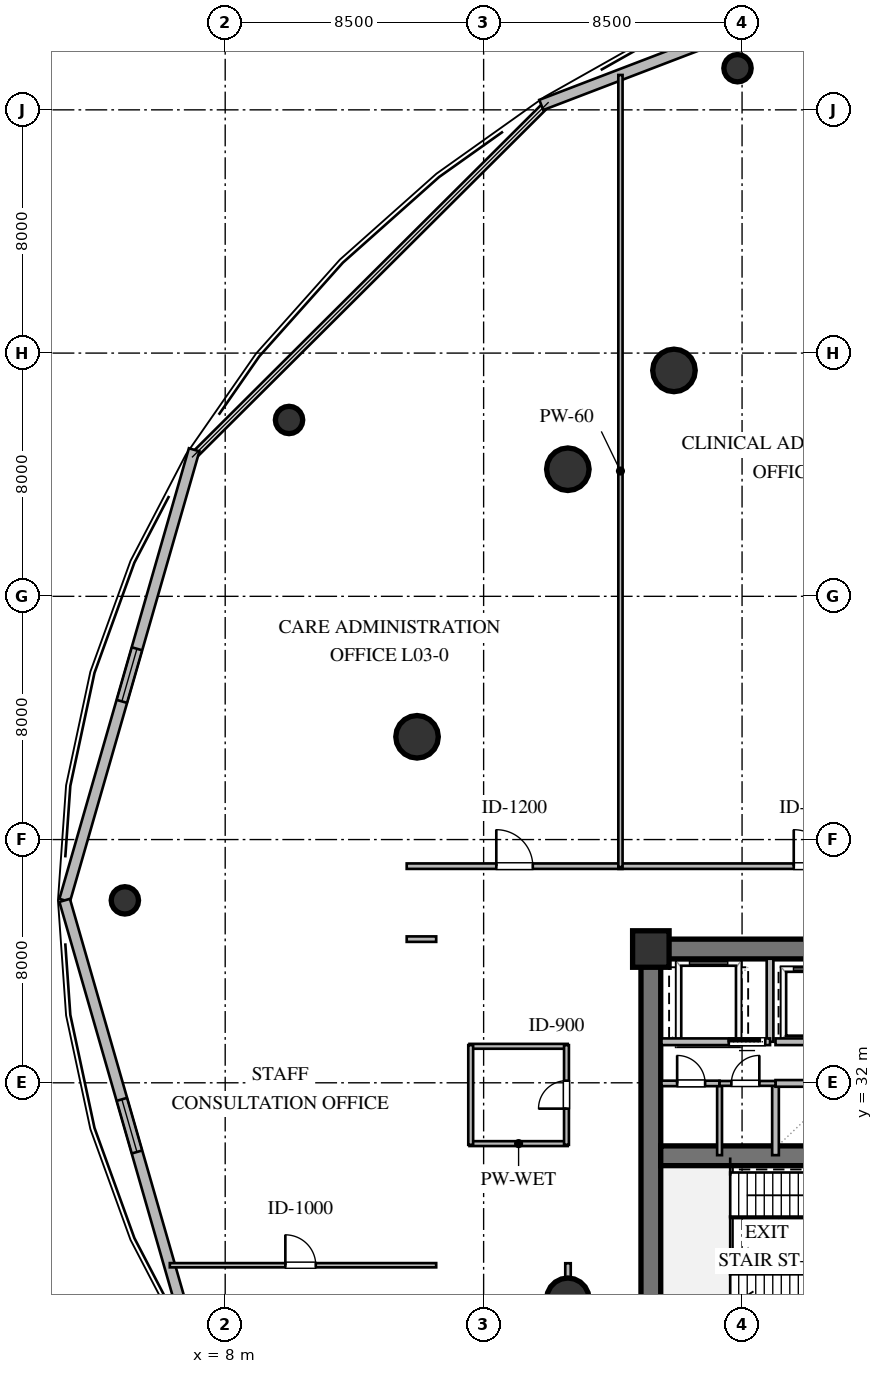
"""IFC4 building model, lengths in metres.
Left out: names, types, materials, properties, quantities, classifications, styles, units other than length and angle.
Written with IfcOpenShell. Run it as: python <this file> out.ifc"""

import sys

from ifc_helpers import new_model, si_unit, direction, frame, frame_2d, origin, origin_2d, place, context, subcontext, project, spatial, rectangle, circle, extrude, element, fill, save


model = new_model("IFC4")
c1 = context("Model", 3, precision=1e-05, world=origin(), true_north=direction((0.0, 1.0)))
c2 = subcontext(c1, "Body", "Model", "MODEL_VIEW")
j1 = project(units=[si_unit("LENGTHUNIT", "METRE"), si_unit("PLANEANGLEUNIT", "RADIAN")], contexts=[c1])
p1 = place(None, origin())
s1 = spatial("IfcSite", under=j1, at=p1, CompositionType="ELEMENT")
p2 = place(p1, origin())
s2 = spatial("IfcBuilding", under=s1, at=p2, CompositionType="ELEMENT")
p3 = place(p2, frame((0.0, 0.0, 14.4)))
s3 = spatial("IfcBuildingStorey", under=s2, at=p3, CompositionType="ELEMENT", Elevation=14.4)
p4 = place(p3, frame((21.675, 36.4, 0.0), z_axis=(0.0, 0.0, 1.0), x_axis=(1.0, 0.0, 0.0)))
e1 = element("IfcWall", 1, at=p4, inside=s3, PredefinedType="SHEAR", context=c2, shape_type="SweptSolid", body=[
    extrude(rectangle(XDim=22.65, YDim=0.65, at=frame_2d((11.325, 0.0))), origin(), (0.0, 0.0, 1.0), 4.52),
])
p5 = place(p3, frame((22.0, 23.925, 0.0), z_axis=(0.0, 0.0, 1.0), x_axis=(0.0, 1.0, 0.0)))
e2 = element("IfcWall", 2, at=p5, inside=s3, PredefinedType="SHEAR", context=c2, shape_type="SweptSolid", body=[
    extrude(rectangle(XDim=12.15, YDim=0.65, at=frame_2d((6.075, 0.0))), origin(), (0.0, 0.0, 1.0), 4.52),
])
p6 = place(p3, frame((22.325, 29.6, 0.0), z_axis=(0.0, 0.0, 1.0), x_axis=(1.0, 0.0, 0.0)))
e3 = element("IfcWall", 3, at=p6, inside=s3, PredefinedType="SHEAR", context=c2, shape_type="SweptSolid", body=[
    extrude(rectangle(XDim=21.35, YDim=0.65, at=frame_2d((10.675, 0.0))), origin(), (0.0, 0.0, 1.0), 4.52),
])
p7 = place(p6, frame((12.125, 0.0, 0.0)))
e4 = element("IfcOpeningElement", 4, at=p7, cuts=e3, PredefinedType="OPENING", context=c2, shape_type="SweptSolid", body=[
    extrude(rectangle(XDim=1.15, YDim=2.1, at=frame_2d((0.575, 1.05))), frame((0.0, 0.335, 0.0), z_axis=(0.0, -1.0, 0.0), x_axis=(1.0, 0.0, 0.0)), (0.0, 0.0, 1.0), 0.67),
])
p8 = place(p3, frame((22.0, 36.4, 0.0), z_axis=(0.0, 0.0, 1.0), x_axis=(1.0, 0.0, 0.0)))
e5 = element("IfcColumn", 5, at=p8, inside=s3, PredefinedType="COLUMN", context=c2, shape_type="SweptSolid", body=[
    extrude(rectangle(XDim=1.2, YDim=1.2, at=origin_2d()), origin(), (0.0, 0.0, 1.0), 4.8),
])
for number, where, z_axis, x_axis in (
    (6, (22.76, 55.43, 0.0), (0.0, 0.0, 1.0), (1.0, 0.0, 0.0)),
    (7, (19.27, 52.18, 0.0), (0.0, 0.0, 1.0), (1.0, 0.0, 0.0)),
    (8, (14.31, 43.38, 0.0), (0.0, 0.0, 1.0), (1.0, 0.0, 0.0)),
    (9, (19.27, 24.88, 0.0), (0.0, 0.0, 1.0), (1.0, 0.0, 0.0)),
):
    element("IfcColumn", number, at=place(p3, frame(where, z_axis=z_axis, x_axis=x_axis)), inside=s3, PredefinedType="COLUMN", context=c2, shape_type="SweptSolid", body=[
        extrude(circle(Radius=0.7, at=origin_2d()), origin(), (0.0, 0.0, 1.0), 4.8),
    ])
for number, where, z_axis, x_axis in (
    (10, (24.85, 65.37, 0.0), (0.0, 0.0, 1.0), (1.0, 0.0, 0.0)),
    (11, (10.1, 53.8, 0.0), (0.0, 0.0, 1.0), (1.0, 0.0, 0.0)),
    (12, (4.7, 38.0, 0.0), (0.0, 0.0, 1.0), (1.0, 0.0, 0.0)),
):
    element("IfcColumn", number, at=place(p3, frame(where, z_axis=z_axis, x_axis=x_axis)), inside=s3, PredefinedType="COLUMN", context=c2, shape_type="SweptSolid", body=[
        extrude(circle(Radius=0.45, at=origin_2d()), origin(), (0.0, 0.0, 1.0), 4.8),
    ])
p9 = place(p3, frame((35.835, 70.831, 0.0), z_axis=(0.0, 0.0, 1.0), x_axis=(-0.934010262022, -0.357246176238, 0.0)))
e13 = element("IfcWall", 13, at=p9, inside=s3, PredefinedType="STANDARD", context=c2, shape_type="SweptSolid", body=[
    extrude(rectangle(XDim=18.671, YDim=0.36, at=frame_2d((9.335, 0.0))), origin(), (0.0, 0.0, 1.0), 4.52),
])
p10 = place(p9, frame((8.436, 0.0, 1.05)))
e14 = element("IfcOpeningElement", 14, at=p10, cuts=e13, PredefinedType="OPENING", context=c2, shape_type="SweptSolid", body=[
    extrude(rectangle(XDim=1.8, YDim=1.7, at=frame_2d((0.9, 0.85))), frame((0.0, 0.19, 0.0), z_axis=(0.0, -1.0, 0.0), x_axis=(1.0, 0.0, 0.0)), (0.0, 0.0, 1.0), 0.38),
])
p11 = place(p3, frame((6.979, 52.82, 0.0), z_axis=(0.0, 0.0, 1.0), x_axis=(-0.276203409751, -0.961099202186, 0.0)))
e15 = element("IfcWall", 15, at=p11, inside=s3, PredefinedType="STANDARD", context=c2, shape_type="SweptSolid", body=[
    extrude(rectangle(XDim=15.42, YDim=0.36, at=frame_2d((7.71, 0.0))), origin(), (0.0, 0.0, 1.0), 4.52),
])
p12 = place(p11, frame((6.81, 0.0, 1.05)))
e16 = element("IfcOpeningElement", 16, at=p12, cuts=e15, PredefinedType="OPENING", context=c2, shape_type="SweptSolid", body=[
    extrude(rectangle(XDim=1.8, YDim=1.7, at=frame_2d((0.9, 0.85))), frame((0.0, 0.19, 0.0), z_axis=(0.0, -1.0, 0.0), x_axis=(1.0, 0.0, 0.0)), (0.0, 0.0, 1.0), 0.38),
])
p13 = place(p3, frame((2.72, 38.0, 0.0), z_axis=(0.0, 0.0, 1.0), x_axis=(0.276203409751, -0.961099202186, 0.0)))
e17 = element("IfcWall", 17, at=p13, inside=s3, PredefinedType="STANDARD", context=c2, shape_type="SweptSolid", body=[
    extrude(rectangle(XDim=15.42, YDim=0.36, at=frame_2d((7.71, 0.0))), origin(), (0.0, 0.0, 1.0), 4.52),
])
p14 = place(p13, frame((6.81, 0.0, 1.05)))
e18 = element("IfcOpeningElement", 18, at=p14, cuts=e17, PredefinedType="OPENING", context=c2, shape_type="SweptSolid", body=[
    extrude(rectangle(XDim=1.8, YDim=1.7, at=frame_2d((0.9, 0.85))), frame((0.0, 0.19, 0.0), z_axis=(0.0, -1.0, 0.0), x_axis=(1.0, 0.0, 0.0)), (0.0, 0.0, 1.0), 0.38),
])
p15 = place(p3, frame((25.92, 33.35, 0.0), z_axis=(0.0, 0.0, 1.0), x_axis=(0.0, 1.0, 0.0)))
e19 = element("IfcWall", 19, at=p15, inside=s3, PredefinedType="SOLIDWALL", context=c2, shape_type="SweptSolid", body=[
    extrude(rectangle(XDim=2.73, YDim=0.22, at=frame_2d((1.365, 0.0))), origin(), (0.0, 0.0, 1.0), 4.52),
])
p16 = place(p3, frame((22.35, 33.35, 0.0), z_axis=(0.0, 0.0, 1.0), x_axis=(1.0, 0.0, 0.0)))
e20 = element("IfcWall", 20, at=p16, inside=s3, PredefinedType="SOLIDWALL", context=c2, shape_type="SweptSolid", body=[
    extrude(rectangle(XDim=3.57, YDim=0.22, at=frame_2d((1.785, 0.0))), origin(), (0.0, 0.0, 1.0), 4.52),
])
p17 = place(p16, frame((2.213, 0.0, 0.0)))
e21 = element("IfcOpeningElement", 21, at=p17, cuts=e20, PredefinedType="OPENING", context=c2, shape_type="SweptSolid", body=[
    extrude(rectangle(XDim=1.2, YDim=2.1, at=frame_2d((0.6, 1.05))), frame((0.0, 0.12, 0.0), z_axis=(0.0, -1.0, 0.0), x_axis=(1.0, 0.0, 0.0)), (0.0, 0.0, 1.0), 0.24),
])
p18 = place(p3, frame((26.1, 29.62, 0.0), z_axis=(0.0, 0.0, 1.0), x_axis=(0.0, 1.0, 0.0)))
e22 = element("IfcWall", 22, at=p18, inside=s3, PredefinedType="SOLIDWALL", context=c2, shape_type="SweptSolid", body=[
    extrude(rectangle(XDim=2.36, YDim=0.22, at=frame_2d((1.18, 0.0))), origin(), (0.0, 0.0, 1.0), 4.52),
])
p19 = place(p3, frame((26.1, 31.98, 0.0), z_axis=(0.0, 0.0, 1.0), x_axis=(1.0, 0.0, 0.0)))
e23 = element("IfcWall", 23, at=p19, inside=s3, PredefinedType="SOLIDWALL", context=c2, shape_type="SweptSolid", body=[
    extrude(rectangle(XDim=7.8, YDim=0.22, at=frame_2d((3.9, 0.0))), origin(), (0.0, 0.0, 1.0), 4.52),
])
p20 = place(p3, frame((26.1, 33.35, 0.0), z_axis=(0.0, 0.0, 1.0), x_axis=(1.0, 0.0, 0.0)))
e24 = element("IfcWall", 24, at=p20, inside=s3, PredefinedType="SOLIDWALL", context=c2, shape_type="SweptSolid", body=[
    extrude(rectangle(XDim=7.8, YDim=0.22, at=frame_2d((3.9, 0.0))), origin(), (0.0, 0.0, 1.0), 4.52),
])
p21 = place(p20, frame((1.4, 0.0, 0.0)))
e25 = element("IfcOpeningElement", 25, at=p21, cuts=e24, PredefinedType="OPENING", context=c2, shape_type="SweptSolid", body=[
    extrude(rectangle(XDim=1.1, YDim=2.1, at=frame_2d((0.55, 1.05))), frame((0.0, 0.12, 0.0), z_axis=(0.0, -1.0, 0.0), x_axis=(1.0, 0.0, 0.0)), (0.0, 0.0, 1.0), 0.24),
])
p22 = place(p20, frame((5.066, 0.0, 0.0)))
e26 = element("IfcOpeningElement", 26, at=p22, cuts=e24, PredefinedType="OPENING", context=c2, shape_type="SweptSolid", body=[
    extrude(rectangle(XDim=1.1, YDim=2.1, at=frame_2d((0.55, 1.05))), frame((0.0, 0.12, 0.0), z_axis=(0.0, -1.0, 0.0), x_axis=(1.0, 0.0, 0.0)), (0.0, 0.0, 1.0), 0.24),
])
p23 = place(p3, frame((24.26, 29.62, 0.0), z_axis=(0.0, 0.0, 1.0), x_axis=(0.0, 1.0, 0.0)))
e27 = element("IfcWall", 27, at=p23, inside=s3, PredefinedType="PLUMBINGWALL", context=c2, shape_type="SweptSolid", body=[
    extrude(rectangle(XDim=2.36, YDim=0.16, at=frame_2d((1.18, 0.0))), origin(), (0.0, 0.0, 1.0), 1.887),
])
p24 = place(p3, frame((22.35, 31.98, 0.0), z_axis=(0.0, 0.0, 1.0), x_axis=(1.0, 0.0, 0.0)))
e28 = element("IfcWall", 28, at=p24, inside=s3, PredefinedType="PARTITIONING", context=c2, shape_type="SweptSolid", body=[
    extrude(rectangle(XDim=1.91, YDim=0.18, at=frame_2d((0.955, 0.0))), origin(), (0.0, 0.0, 1.0), 4.52),
])
p25 = place(p24, frame((0.515, 0.0, 0.0)))
e29 = element("IfcOpeningElement", 29, at=p25, cuts=e28, PredefinedType="OPENING", context=c2, shape_type="SweptSolid", body=[
    extrude(rectangle(XDim=0.92, YDim=2.1, at=frame_2d((0.46, 1.05))), frame((0.0, 0.1, 0.0), z_axis=(0.0, -1.0, 0.0), x_axis=(1.0, 0.0, 0.0)), (0.0, 0.0, 1.0), 0.2),
])
p26 = place(p3, frame((24.26, 31.98, 0.0), z_axis=(0.0, 0.0, 1.0), x_axis=(1.0, 0.0, 0.0)))
e30 = element("IfcWall", 30, at=p26, inside=s3, PredefinedType="PLUMBINGWALL", context=c2, shape_type="SweptSolid", body=[
    extrude(rectangle(XDim=1.84, YDim=0.16, at=frame_2d((0.92, 0.0))), origin(), (0.0, 0.0, 1.0), 4.52),
])
p27 = place(p26, frame((0.388, 0.0, 0.0)))
e31 = element("IfcOpeningElement", 31, at=p27, cuts=e30, PredefinedType="OPENING", context=c2, shape_type="SweptSolid", body=[
    extrude(rectangle(XDim=0.92, YDim=2.1, at=frame_2d((0.46, 1.05))), frame((0.0, 0.09, 0.0), z_axis=(0.0, -1.0, 0.0), x_axis=(1.0, 0.0, 0.0)), (0.0, 0.0, 1.0), 0.18),
])
for number, where, z_axis, x_axis in (
    (32, (16.035, 30.0, 0.0), (0.0, 0.0, 1.0), (1.0, 0.0, 0.0)),
    (33, (16.035, 33.2, 0.0), (0.0, 0.0, 1.0), (1.0, 0.0, 0.0)),
):
    element("IfcWall", number, at=place(p3, frame(where, z_axis=z_axis, x_axis=x_axis)), inside=s3, PredefinedType="PLUMBINGWALL", context=c2, shape_type="SweptSolid", body=[
        extrude(rectangle(XDim=3.23, YDim=0.16, at=frame_2d((1.615, 0.0))), origin(), (0.0, 0.0, 1.0), 4.52),
    ])
p28 = place(p3, frame((16.075, 29.96, 0.0), z_axis=(0.0, 0.0, 1.0), x_axis=(0.0, 1.0, 0.0)))
e34 = element("IfcWall", 34, at=p28, inside=s3, PredefinedType="PLUMBINGWALL", context=c2, shape_type="SweptSolid", body=[
    extrude(rectangle(XDim=3.28, YDim=0.16, at=frame_2d((1.64, 0.0))), origin(), (0.0, 0.0, 1.0), 4.52),
])
p29 = place(p3, frame((19.225, 29.96, 0.0), z_axis=(0.0, 0.0, 1.0), x_axis=(0.0, 1.0, 0.0)))
e35 = element("IfcWall", 35, at=p29, inside=s3, PredefinedType="PLUMBINGWALL", context=c2, shape_type="SweptSolid", body=[
    extrude(rectangle(XDim=3.28, YDim=0.16, at=frame_2d((1.64, 0.0))), origin(), (0.0, 0.0, 1.0), 4.52),
])
p30 = place(p29, frame((1.19, 0.0, 0.0)))
e36 = element("IfcOpeningElement", 36, at=p30, cuts=e35, PredefinedType="OPENING", context=c2, shape_type="SweptSolid", body=[
    extrude(rectangle(XDim=0.92, YDim=2.1, at=frame_2d((0.46, 1.05))), frame((0.0, 0.09, 0.0), z_axis=(0.0, -1.0, 0.0), x_axis=(1.0, 0.0, 0.0)), (0.0, 0.0, 1.0), 0.18),
])
p31 = place(p3, frame((13.97, 39.125, 0.0), z_axis=(0.0, 0.0, 1.0), x_axis=(1.0, 0.0, 0.0)))
e37 = element("IfcWall", 37, at=p31, inside=s3, PredefinedType="PARTITIONING", context=c2, shape_type="SweptSolid", body=[
    extrude(rectangle(XDim=7.095, YDim=0.18, at=frame_2d((3.547, 0.0))), origin(), (0.0, 0.0, 1.0), 4.52),
])
p32 = place(p31, frame((2.947, 0.0, 0.0)))
e38 = element("IfcOpeningElement", 38, at=p32, cuts=e37, PredefinedType="OPENING", context=c2, shape_type="SweptSolid", body=[
    extrude(rectangle(XDim=1.2, YDim=2.15, at=frame_2d((0.6, 1.075))), frame((0.0, 0.1, 0.0), z_axis=(0.0, -1.0, 0.0), x_axis=(1.0, 0.0, 0.0)), (0.0, 0.0, 1.0), 0.2),
])
p33 = place(p3, frame((20.935, 39.125, 0.0), z_axis=(0.0, 0.0, 1.0), x_axis=(1.0, 0.0, 0.0)))
e39 = element("IfcWall", 39, at=p33, inside=s3, PredefinedType="PARTITIONING", context=c2, shape_type="SweptSolid", body=[
    extrude(rectangle(XDim=12.73, YDim=0.18, at=frame_2d((6.365, 0.0))), origin(), (0.0, 0.0, 1.0), 4.52),
])
p34 = place(p33, frame((5.765, 0.0, 0.0)))
e40 = element("IfcOpeningElement", 40, at=p34, cuts=e39, PredefinedType="OPENING", context=c2, shape_type="SweptSolid", body=[
    extrude(rectangle(XDim=1.2, YDim=2.15, at=frame_2d((0.6, 1.075))), frame((0.0, 0.1, 0.0), z_axis=(0.0, -1.0, 0.0), x_axis=(1.0, 0.0, 0.0)), (0.0, 0.0, 1.0), 0.2),
])
p35 = place(p3, frame((19.275, 19.97, 0.0), z_axis=(0.0, 0.0, 1.0), x_axis=(0.0, 1.0, 0.0)))
e41 = element("IfcWall", 41, at=p35, inside=s3, PredefinedType="PARTITIONING", context=c2, shape_type="SweptSolid", body=[
    extrude(rectangle(XDim=6.095, YDim=0.18, at=frame_2d((3.047, 0.0))), origin(), (0.0, 0.0, 1.0), 3.898),
])
p36 = place(p35, frame((1.647, 0.0, 0.0)))
e42 = element("IfcOpeningElement", 42, at=p36, cuts=e41, PredefinedType="OPENING", context=c2, shape_type="SweptSolid", body=[
    extrude(rectangle(XDim=1.2, YDim=2.15, at=frame_2d((0.6, 1.075))), frame((0.0, 0.1, 0.0), z_axis=(0.0, -1.0, 0.0), x_axis=(1.0, 0.0, 0.0)), (0.0, 0.0, 1.0), 0.2),
])
p37 = place(p3, frame((14.94, 36.725, 0.0), z_axis=(0.0, 0.0, 1.0), x_axis=(-1.0, 0.0, 0.0)))
e43 = element("IfcWall", 43, at=p37, inside=s3, PredefinedType="PARTITIONING", context=c2, shape_type="SweptSolid", body=[
    extrude(rectangle(XDim=0.97, YDim=0.18, at=frame_2d((0.485, 0.0))), origin(), (0.0, 0.0, 1.0), 4.52),
])
p38 = place(p3, frame((21.0, 65.147, 0.0), z_axis=(0.0, 0.0, 1.0), x_axis=(0.0, -1.0, 0.0)))
e44 = element("IfcWall", 44, at=p38, inside=s3, PredefinedType="PARTITIONING", context=c2, shape_type="SweptSolid", body=[
    extrude(rectangle(XDim=26.052, YDim=0.14, at=frame_2d((13.026, 0.0))), origin(), (0.0, 0.0, 1.0), 4.05),
])
p39 = place(p3, frame((6.179, 26.0, 0.0), z_axis=(0.0, 0.0, 1.0), x_axis=(1.0, 0.0, 0.0)))
e45 = element("IfcWall", 45, at=p39, inside=s3, PredefinedType="PARTITIONING", context=c2, shape_type="SweptSolid", body=[
    extrude(rectangle(XDim=8.761, YDim=0.14, at=frame_2d((4.381, 0.0))), origin(), (0.0, 0.0, 1.0), 4.52),
])
p40 = place(p39, frame((3.8, 0.0, 0.0)))
e46 = element("IfcOpeningElement", 46, at=p40, cuts=e45, PredefinedType="OPENING", context=c2, shape_type="SweptSolid", body=[
    extrude(rectangle(XDim=1.0, YDim=2.1, at=frame_2d((0.5, 1.05))), frame((0.0, 0.08, 0.0), z_axis=(0.0, -1.0, 0.0), x_axis=(1.0, 0.0, 0.0)), (0.0, 0.0, 1.0), 0.16),
])
p41 = place(p12, origin())
e47 = element("IfcWindow", 47, at=p41, inside=s3, PartitioningType="SINGLE_PANEL", PredefinedType="WINDOW", context=c2, shape_type="SweptSolid", body=[
    extrude(rectangle(XDim=1.8, YDim=1.7, at=frame_2d((0.9, 0.85))), frame((0.0, 0.03, 0.0), z_axis=(0.0, -1.0, 0.0), x_axis=(1.0, 0.0, 0.0)), (0.0, 0.0, 1.0), 0.06),
])
fill(e16, e47)
p42 = place(p14, origin())
e48 = element("IfcWindow", 48, at=p42, inside=s3, PartitioningType="SINGLE_PANEL", PredefinedType="WINDOW", context=c2, shape_type="SweptSolid", body=[
    extrude(rectangle(XDim=1.8, YDim=1.7, at=frame_2d((0.9, 0.85))), frame((0.0, 0.03, 0.0), z_axis=(0.0, -1.0, 0.0), x_axis=(1.0, 0.0, 0.0)), (0.0, 0.0, 1.0), 0.06),
])
fill(e18, e48)
p43 = place(p17, origin())
e49 = element("IfcDoor", 49, at=p43, inside=s3, OperationType="SLIDING_TO_LEFT", PredefinedType="DOOR", context=c2, shape_type="SweptSolid", body=[
    extrude(rectangle(XDim=1.2, YDim=2.1, at=frame_2d((0.6, 1.05))), frame((0.0, 0.025, 0.0), z_axis=(0.0, -1.0, 0.0), x_axis=(1.0, 0.0, 0.0)), (0.0, 0.0, 1.0), 0.05),
])
fill(e21, e49)
p44 = place(p25, origin())
e50 = element("IfcDoor", 50, at=p44, inside=s3, OperationType="SINGLE_SWING_LEFT", PredefinedType="DOOR", context=c2, shape_type="SweptSolid", body=[
    extrude(rectangle(XDim=0.92, YDim=2.1, at=frame_2d((0.46, 1.05))), frame((0.0, 0.025, 0.0), z_axis=(0.0, -1.0, 0.0), x_axis=(1.0, 0.0, 0.0)), (0.0, 0.0, 1.0), 0.05),
])
fill(e29, e50)
p45 = place(p27, origin())
e51 = element("IfcDoor", 51, at=p45, inside=s3, OperationType="SINGLE_SWING_RIGHT", PredefinedType="DOOR", context=c2, shape_type="SweptSolid", body=[
    extrude(rectangle(XDim=0.92, YDim=2.1, at=frame_2d((0.46, 1.05))), frame((0.0, 0.025, 0.0), z_axis=(0.0, -1.0, 0.0), x_axis=(1.0, 0.0, 0.0)), (0.0, 0.0, 1.0), 0.05),
])
fill(e31, e51)
p46 = place(p30, origin())
e52 = element("IfcDoor", 52, at=p46, inside=s3, OperationType="SINGLE_SWING_LEFT", PredefinedType="DOOR", context=c2, shape_type="SweptSolid", body=[
    extrude(rectangle(XDim=0.92, YDim=2.1, at=frame_2d((0.46, 1.05))), frame((0.0, 0.025, 0.0), z_axis=(0.0, -1.0, 0.0), x_axis=(1.0, 0.0, 0.0)), (0.0, 0.0, 1.0), 0.05),
])
fill(e36, e52)
p47 = place(p32, origin())
e53 = element("IfcDoor", 53, at=p47, inside=s3, OperationType="SINGLE_SWING_LEFT", PredefinedType="DOOR", context=c2, shape_type="SweptSolid", body=[
    extrude(rectangle(XDim=1.2, YDim=2.15, at=frame_2d((0.6, 1.075))), frame((0.0, 0.025, 0.0), z_axis=(0.0, -1.0, 0.0), x_axis=(1.0, 0.0, 0.0)), (0.0, 0.0, 1.0), 0.05),
])
fill(e38, e53)
p48 = place(p34, origin())
e54 = element("IfcDoor", 54, at=p48, inside=s3, OperationType="SINGLE_SWING_LEFT", PredefinedType="DOOR", context=c2, shape_type="SweptSolid", body=[
    extrude(rectangle(XDim=1.2, YDim=2.15, at=frame_2d((0.6, 1.075))), frame((0.0, 0.025, 0.0), z_axis=(0.0, -1.0, 0.0), x_axis=(1.0, 0.0, 0.0)), (0.0, 0.0, 1.0), 0.05),
])
fill(e40, e54)
p49 = place(p40, origin())
e55 = element("IfcDoor", 55, at=p49, inside=s3, OperationType="SINGLE_SWING_LEFT", PredefinedType="DOOR", context=c2, shape_type="SweptSolid", body=[
    extrude(rectangle(XDim=1.0, YDim=2.1, at=frame_2d((0.5, 1.05))), frame((0.0, 0.025, 0.0), z_axis=(0.0, -1.0, 0.0), x_axis=(1.0, 0.0, 0.0)), (0.0, 0.0, 1.0), 0.05),
])
fill(e46, e55)
save(model, sys.argv[1])
